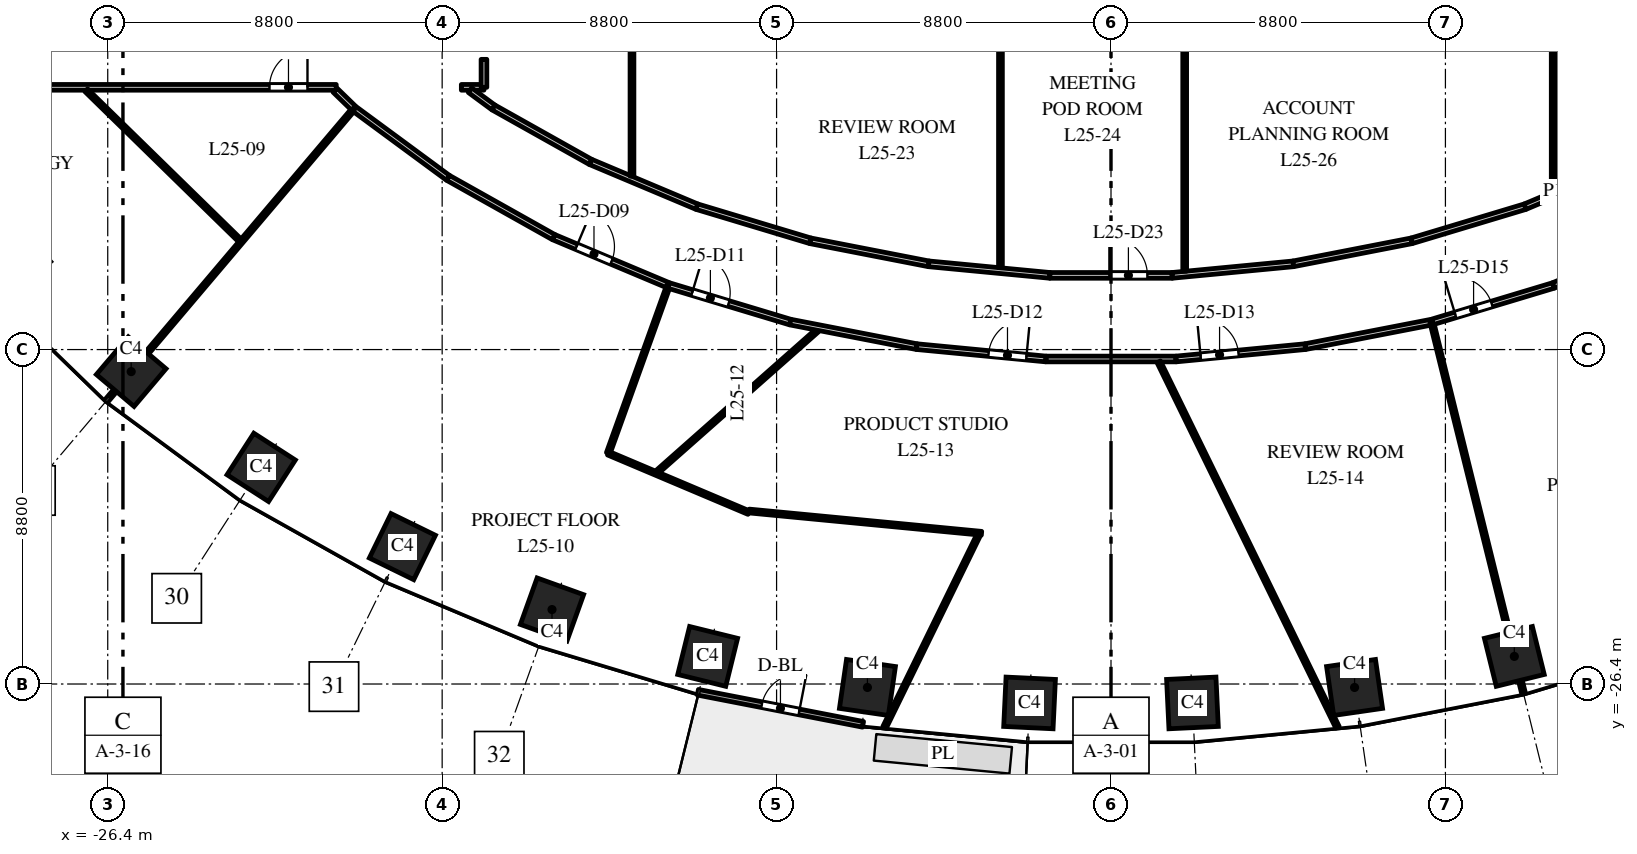
"""IFC4 building model, lengths in metres.
Left out: names, types, materials, properties, quantities, classifications, styles, units other than length and angle.
Written with IfcOpenShell. Run it as: python <this file> out.ifc"""

import sys

from ifc_helpers import new_model, si_unit, direction, frame, frame_2d, origin, origin_2d, place, context, subcontext, project, spatial, rectangle, extrude, element, fill, save


model = new_model("IFC4")
c1 = context("Model", 3, precision=1e-05, world=origin(), true_north=direction((0.0, 1.0)))
c2 = subcontext(c1, "Body", "Model", "MODEL_VIEW")
j1 = project(units=[si_unit("LENGTHUNIT", "METRE"), si_unit("PLANEANGLEUNIT", "RADIAN")], contexts=[c1])
p1 = place(None, origin())
s1 = spatial("IfcSite", under=j1, at=p1, CompositionType="ELEMENT")
p2 = place(p1, origin())
s2 = spatial("IfcBuilding", under=s1, at=p2, CompositionType="ELEMENT")
p3 = place(p2, frame((0.0, 0.0, 112.0)))
s3 = spatial("IfcBuildingStorey", under=s2, at=p3, CompositionType="ELEMENT", Elevation=112.0)
for number, where, z_axis, x_axis in (
    (1, (-25.783, -18.18, 0.0), (0.0, 0.0, 1.0), (0.763, -0.646, 0.0)),
    (2, (-22.362, -20.7, 0.0), (0.0, 0.0, 1.0), (0.84, -0.542, 0.0)),
    (3, (-18.646, -22.785, 0.0), (0.0, 0.0, 1.0), (0.898, -0.439, 0.0)),
    (4, (-14.709, -24.441, 0.0), (0.0, 0.0, 1.0), (0.941, -0.338, 0.0)),
    (5, (-10.613, -25.674, 0.0), (0.0, 0.0, 1.0), (0.971, -0.24, 0.0)),
    (6, (-6.409, -26.491, 0.0), (0.0, 0.0, 1.0), (0.99, -0.143, 0.0)),
    (7, (-2.143, -26.898, 0.0), (0.0, 0.0, 1.0), (0.999, -0.048, 0.0)),
    (8, (2.143, -26.898, 0.0), (0.0, 0.0, 1.0), (0.999, 0.048, 0.0)),
    (9, (6.409, -26.491, 0.0), (0.0, 0.0, 1.0), (0.99, 0.143, 0.0)),
    (10, (10.613, -25.674, 0.0), (0.0, 0.0, 1.0), (0.971, 0.24, 0.0)),
):
    element("IfcColumn", number, at=place(p3, frame(where, z_axis=z_axis, x_axis=x_axis)), inside=s3, PredefinedType="COLUMN", context=c2, shape_type="SweptSolid", body=[
        extrude(rectangle(XDim=1.3, YDim=1.3, at=origin_2d()), origin(), (0.0, 0.0, 1.0), 4.0),
    ])
p4 = place(p3, frame((-10.871, -26.617, 0.0), z_axis=(0.0, 0.0, 1.0), x_axis=(0.981631174778, -0.190788460615, 0.0)))
e11 = element("IfcWall", 11, at=p4, inside=s3, PredefinedType="STANDARD", context=c2, shape_type="SweptSolid", body=[
    extrude(rectangle(XDim=4.426, YDim=0.15, at=frame_2d((2.213, 0.0))), origin(), (0.0, 0.0, 1.0), 3.7),
])
p5 = place(p4, frame((1.713, 0.0, 0.0)))
e12 = element("IfcOpeningElement", 12, at=p5, cuts=e11, PredefinedType="OPENING", context=c2, shape_type="SweptSolid", body=[
    extrude(rectangle(XDim=1.0, YDim=2.4, at=frame_2d((0.5, 1.2))), frame((0.0, 0.085, 0.0), z_axis=(0.0, -1.0, 0.0), x_axis=(1.0, 0.0, 0.0)), (0.0, 0.0, 1.0), 0.17),
])
p6 = place(p3, frame((-31.5, -10.7, 0.0), z_axis=(0.0, 0.0, 1.0), x_axis=(1.0, 0.0, 0.0)))
e13 = element("IfcWall", 13, at=p6, inside=s3, PredefinedType="PARTITIONING", context=c2, shape_type="SweptSolid", body=[
    extrude(rectangle(XDim=11.113, YDim=0.15, at=frame_2d((5.557, 0.0))), origin(), (0.0, 0.0, 1.0), 3.1),
])
p7 = place(p6, frame((1.4, 0.0, 0.0)))
e14 = element("IfcOpeningElement", 14, at=p7, cuts=e13, PredefinedType="OPENING", context=c2, shape_type="SweptSolid", body=[
    extrude(rectangle(XDim=1.0, YDim=2.1, at=frame_2d((0.5, 1.05))), frame((0.0, 0.085, 0.0), z_axis=(0.0, -1.0, 0.0), x_axis=(1.0, 0.0, 0.0)), (0.0, 0.0, 1.0), 0.17),
])
p8 = place(p6, frame((9.356, 0.0, 0.0)))
e15 = element("IfcOpeningElement", 15, at=p8, cuts=e13, PredefinedType="OPENING", context=c2, shape_type="SweptSolid", body=[
    extrude(rectangle(XDim=1.0, YDim=2.1, at=frame_2d((0.5, 1.05))), frame((0.0, 0.085, 0.0), z_axis=(0.0, -1.0, 0.0), x_axis=(1.0, 0.0, 0.0)), (0.0, 0.0, 1.0), 0.17),
])
p9 = place(p3, frame((-26.965, -10.778, 0.0), z_axis=(0.0, 0.0, 1.0), x_axis=(0.715118482903, -0.699003258512, 0.0)))
e16 = element("IfcWall", 16, at=p9, inside=s3, PredefinedType="PARTITIONING", context=c2, shape_type="SweptSolid", body=[
    extrude(rectangle(XDim=5.651, YDim=0.1, at=frame_2d((2.825, 0.0))), origin(), (0.0, 0.0, 1.0), 3.7),
])
p10 = place(p3, frame((-26.43, -18.945, 0.0), z_axis=(0.0, 0.0, 1.0), x_axis=(0.64633128205, 0.763056927, 0.0)))
e17 = element("IfcWall", 17, at=p10, inside=s3, PredefinedType="PARTITIONING", context=c2, shape_type="SweptSolid", body=[
    extrude(rectangle(XDim=10.069, YDim=0.1, at=frame_2d((5.034, 0.0))), origin(), (0.0, 0.0, 1.0), 3.7),
])
p11 = place(p3, frame((-20.418, -10.775, 0.0), z_axis=(0.0, 0.0, 1.0), x_axis=(0.717145300924, -0.69692368116, 0.0)))
e18 = element("IfcWall", 18, at=p11, inside=s3, PredefinedType="PARTITIONING", context=c2, shape_type="SweptSolid", body=[
    extrude(rectangle(XDim=0.676, YDim=0.15, at=frame_2d((0.338, 0.0))), origin(), (0.0, 0.0, 1.0), 3.7),
])
p12 = place(p3, frame((-19.903, -11.272, 0.0), z_axis=(0.0, 0.0, 1.0), x_axis=(0.805228684186, -0.592964388613, 0.0)))
e19 = element("IfcWall", 19, at=p12, inside=s3, PredefinedType="PARTITIONING", context=c2, shape_type="SweptSolid", body=[
    extrude(rectangle(XDim=3.052, YDim=0.15, at=frame_2d((1.526, 0.0))), origin(), (0.0, 0.0, 1.0), 2.75),
])
p13 = place(p3, frame((-17.445, -13.082, 0.0), z_axis=(0.0, 0.0, 1.0), x_axis=(0.872072095629, -0.489377420837, 0.0)))
e20 = element("IfcWall", 20, at=p13, inside=s3, PredefinedType="PARTITIONING", context=c2, shape_type="SweptSolid", body=[
    extrude(rectangle(XDim=3.188, YDim=0.15, at=frame_2d((1.594, 0.0))), origin(), (0.0, 0.0, 1.0), 3.7),
])
p14 = place(p3, frame((-17.095, -10.7, 0.0), z_axis=(0.0, 0.0, 1.0), x_axis=(1.0, 0.0, 0.0)))
e21 = element("IfcWall", 21, at=p14, inside=s3, PredefinedType="PARTITIONING", context=c2, shape_type="SweptSolid", body=[
    extrude(rectangle(XDim=0.595, YDim=0.15, at=frame_2d((0.297, 0.0))), origin(), (0.0, 0.0, 1.0), 3.7),
])
p15 = place(p3, frame((-16.867, -10.775, 0.0), z_axis=(0.0, 0.0, 1.0), x_axis=(0.804751563869, -0.593611759023, 0.0)))
e22 = element("IfcWall", 22, at=p15, inside=s3, PredefinedType="PARTITIONING", context=c2, shape_type="SweptSolid", body=[
    extrude(rectangle(XDim=0.767, YDim=0.15, at=frame_2d((0.383, 0.0))), origin(), (0.0, 0.0, 1.0), 3.7),
])
p16 = place(p3, frame((-16.5, -10.7, 0.0), z_axis=(0.0, 0.0, 1.0), x_axis=(0.0, 1.0, 0.0)))
e23 = element("IfcWall", 23, at=p16, inside=s3, PredefinedType="PARTITIONING", context=c2, shape_type="SweptSolid", body=[
    extrude(rectangle(XDim=0.736, YDim=0.15, at=frame_2d((0.368, 0.0))), origin(), (0.0, 0.0, 1.0), 3.7),
])
p17 = place(p3, frame((-16.25, -11.23, 0.0), z_axis=(0.0, 0.0, 1.0), x_axis=(0.872147381065, -0.489243237767, 0.0)))
e24 = element("IfcWall", 24, at=p17, inside=s3, PredefinedType="PARTITIONING", context=c2, shape_type="SweptSolid", body=[
    extrude(rectangle(XDim=2.927, YDim=0.15, at=frame_2d((1.464, 0.0))), origin(), (0.0, 0.0, 1.0), 2.75),
])
p18 = place(p3, frame((-14.665, -14.642, 0.0), z_axis=(0.0, 0.0, 1.0), x_axis=(0.921850993012, -0.387544509293, 0.0)))
e25 = element("IfcWall", 25, at=p18, inside=s3, PredefinedType="PARTITIONING", context=c2, shape_type="SweptSolid", body=[
    extrude(rectangle(XDim=3.259, YDim=0.15, at=frame_2d((1.629, 0.0))), origin(), (0.0, 0.0, 1.0), 2.85),
])
p19 = place(p18, frame((0.65, 0.0, 0.0)))
e26 = element("IfcOpeningElement", 26, at=p19, cuts=e25, PredefinedType="OPENING", context=c2, shape_type="SweptSolid", body=[
    extrude(rectangle(XDim=1.0, YDim=2.1, at=frame_2d((0.5, 1.05))), frame((0.0, 0.085, 0.0), z_axis=(0.0, -1.0, 0.0), x_axis=(1.0, 0.0, 0.0)), (0.0, 0.0, 1.0), 0.17),
])
p20 = place(p3, frame((-13.697, -12.662, 0.0), z_axis=(0.0, 0.0, 1.0), x_axis=(0.921751821358, -0.387780324183, 0.0)))
e27 = element("IfcWall", 27, at=p20, inside=s3, PredefinedType="PARTITIONING", context=c2, shape_type="SweptSolid", body=[
    extrude(rectangle(XDim=3.038, YDim=0.15, at=frame_2d((1.519, 0.0))), origin(), (0.0, 0.0, 1.0), 2.85),
])
p21 = place(p3, frame((-13.23, -20.327, 0.0), z_axis=(0.0, 0.0, 1.0), x_axis=(0.338411379185, 0.940998266969, 0.0)))
e28 = element("IfcWall", 28, at=p21, inside=s3, PredefinedType="PARTITIONING", context=c2, shape_type="SweptSolid", body=[
    extrude(rectangle(XDim=4.687, YDim=0.1, at=frame_2d((2.343, 0.0))), origin(), (0.0, 0.0, 1.0), 3.7),
])
p22 = place(p3, frame((-13.23, -20.327, 0.0), z_axis=(0.0, 0.0, 1.0), x_axis=(0.921068797825, -0.389399884017, 0.0)))
e29 = element("IfcWall", 29, at=p22, inside=s3, PredefinedType="PARTITIONING", context=c2, shape_type="SweptSolid", body=[
    extrude(rectangle(XDim=4.014, YDim=0.1, at=frame_2d((2.007, 0.0))), origin(), (0.0, 0.0, 1.0), 3.7),
])
p23 = place(p3, frame((-12.605, -13.036, 0.0), z_axis=(0.0, 0.0, 1.0), x_axis=(0.0, 1.0, 0.0)))
e30 = element("IfcWall", 30, at=p23, inside=s3, PredefinedType="PARTITIONING", context=c2, shape_type="SweptSolid", body=[
    extrude(rectangle(XDim=26.072, YDim=0.1, at=frame_2d((13.036, 0.0))), origin(), (0.0, 0.0, 1.0), 2.75),
])
p24 = place(p3, frame((-11.938, -20.818, 0.0), z_axis=(0.0, 0.0, 1.0), x_axis=(0.749089420646, 0.662468897289, 0.0)))
e31 = element("IfcWall", 31, at=p24, inside=s3, PredefinedType="PARTITIONING", context=c2, shape_type="SweptSolid", body=[
    extrude(rectangle(XDim=5.62, YDim=0.1, at=frame_2d((2.81, 0.0))), origin(), (0.0, 0.0, 1.0), 3.7),
])
p25 = place(p3, frame((-11.643, -15.913, 0.0), z_axis=(0.0, 0.0, 1.0), x_axis=(0.957584891346, -0.288151307243, 0.0)))
e32 = element("IfcWall", 32, at=p25, inside=s3, PredefinedType="PARTITIONING", context=c2, shape_type="SweptSolid", body=[
    extrude(rectangle(XDim=3.345, YDim=0.15, at=frame_2d((1.672, 0.0))), origin(), (0.0, 0.0, 1.0), 3.7),
])
p26 = place(p25, frame((0.65, 0.0, 0.0)))
e33 = element("IfcOpeningElement", 33, at=p26, cuts=e32, PredefinedType="OPENING", context=c2, shape_type="SweptSolid", body=[
    extrude(rectangle(XDim=1.0, YDim=2.1, at=frame_2d((0.5, 1.05))), frame((0.0, 0.085, 0.0), z_axis=(0.0, -1.0, 0.0), x_axis=(1.0, 0.0, 0.0)), (0.0, 0.0, 1.0), 0.17),
])
p27 = place(p3, frame((-10.897, -13.84, 0.0), z_axis=(0.0, 0.0, 1.0), x_axis=(0.957606118849, -0.28808075455, 0.0)))
e34 = element("IfcWall", 34, at=p27, inside=s3, PredefinedType="PARTITIONING", context=c2, shape_type="SweptSolid", body=[
    extrude(rectangle(XDim=3.117, YDim=0.15, at=frame_2d((1.559, 0.0))), origin(), (0.0, 0.0, 1.0), 3.7),
])
p28 = place(p3, frame((-9.523, -21.848, 0.0), z_axis=(0.0, 0.0, 1.0), x_axis=(0.995438322378, -0.095407265659, 0.0)))
e35 = element("IfcWall", 35, at=p28, inside=s3, PredefinedType="PARTITIONING", context=c2, shape_type="SweptSolid", body=[
    extrude(rectangle(XDim=6.144, YDim=0.1, at=frame_2d((3.072, 0.0))), origin(), (0.0, 0.0, 1.0), 2.85),
])
p29 = place(p3, frame((-8.44, -16.877, 0.0), z_axis=(0.0, 0.0, 1.0), x_axis=(0.981665220565, -0.190613207134, 0.0)))
e36 = element("IfcWall", 36, at=p29, inside=s3, PredefinedType="PARTITIONING", context=c2, shape_type="SweptSolid", body=[
    extrude(rectangle(XDim=3.389, YDim=0.15, at=frame_2d((1.695, 0.0))), origin(), (0.0, 0.0, 1.0), 2.85),
])
p30 = place(p3, frame((-7.912, -14.738, 0.0), z_axis=(0.0, 0.0, 1.0), x_axis=(0.981588545092, -0.191007665145, 0.0)))
e37 = element("IfcWall", 37, at=p30, inside=s3, PredefinedType="PARTITIONING", context=c2, shape_type="SweptSolid", body=[
    extrude(rectangle(XDim=3.172, YDim=0.15, at=frame_2d((1.586, 0.0))), origin(), (0.0, 0.0, 1.0), 2.85),
])
p31 = place(p3, frame((-5.958, -27.538, 0.0), z_axis=(0.0, 0.0, 1.0), x_axis=(0.439326712168, 0.8983273568, 0.0)))
e38 = element("IfcWall", 38, at=p31, inside=s3, PredefinedType="PARTITIONING", context=c2, shape_type="SweptSolid", body=[
    extrude(rectangle(XDim=5.634, YDim=0.1, at=frame_2d((2.817, 0.0))), origin(), (0.0, 0.0, 1.0), 2.9),
])
p32 = place(p3, frame((-5.113, -17.523, 0.0), z_axis=(0.0, 0.0, 1.0), x_axis=(0.995466844572, -0.095109207532, 0.0)))
e39 = element("IfcWall", 39, at=p32, inside=s3, PredefinedType="PARTITIONING", context=c2, shape_type="SweptSolid", body=[
    extrude(rectangle(XDim=3.417, YDim=0.15, at=frame_2d((1.708, 0.0))), origin(), (0.0, 0.0, 1.0), 3.7),
])
p33 = place(p32, frame((1.9, 0.0, 0.0)))
e40 = element("IfcOpeningElement", 40, at=p33, cuts=e39, PredefinedType="OPENING", context=c2, shape_type="SweptSolid", body=[
    extrude(rectangle(XDim=1.0, YDim=2.1, at=frame_2d((0.5, 1.05))), frame((0.0, 0.085, 0.0), z_axis=(0.0, -1.0, 0.0), x_axis=(1.0, 0.0, 0.0)), (0.0, 0.0, 1.0), 0.17),
])
p34 = place(p3, frame((-4.798, -15.344, 0.0), z_axis=(0.0, 0.0, 1.0), x_axis=(0.995491705426, -0.09484863957, 0.0)))
e41 = element("IfcWall", 41, at=p34, inside=s3, PredefinedType="PARTITIONING", context=c2, shape_type="SweptSolid", body=[
    extrude(rectangle(XDim=3.205, YDim=0.15, at=frame_2d((1.602, 0.0))), origin(), (0.0, 0.0, 1.0), 3.7),
])
p35 = place(p3, frame((-2.909, -15.445, 0.0), z_axis=(0.0, 0.0, 1.0), x_axis=(0.0, 1.0, 0.0)))
e42 = element("IfcWall", 42, at=p35, inside=s3, PredefinedType="PARTITIONING", context=c2, shape_type="SweptSolid", body=[
    extrude(rectangle(XDim=8.363, YDim=0.1, at=frame_2d((4.182, 0.0))), origin(), (0.0, 0.0, 1.0), 2.9),
])
p36 = place(p3, frame((-1.712, -17.848, 0.0), z_axis=(0.0, 0.0, 1.0), x_axis=(1.0, 0.0, 0.0)))
e43 = element("IfcWall", 43, at=p36, inside=s3, PredefinedType="PARTITIONING", context=c2, shape_type="SweptSolid", body=[
    extrude(rectangle(XDim=3.424, YDim=0.15, at=frame_2d((1.712, 0.0))), origin(), (0.0, 0.0, 1.0), 2.85),
])
p37 = place(p3, frame((-1.608, -15.648, 0.0), z_axis=(0.0, 0.0, 1.0), x_axis=(1.0, 0.0, 0.0)))
e44 = element("IfcWall", 44, at=p37, inside=s3, PredefinedType="PARTITIONING", context=c2, shape_type="SweptSolid", body=[
    extrude(rectangle(XDim=3.216, YDim=0.15, at=frame_2d((1.608, 0.0))), origin(), (0.0, 0.0, 1.0), 2.85),
])
p38 = place(p37, frame((1.566, 0.0, 0.0)))
e45 = element("IfcOpeningElement", 45, at=p38, cuts=e44, PredefinedType="OPENING", context=c2, shape_type="SweptSolid", body=[
    extrude(rectangle(XDim=1.0, YDim=2.1, at=frame_2d((0.5, 1.05))), frame((0.0, 0.085, 0.0), z_axis=(0.0, -1.0, 0.0), x_axis=(1.0, 0.0, 0.0)), (0.0, 0.0, 1.0), 0.17),
])
p39 = place(p3, frame((1.257, -17.923, 0.0), z_axis=(0.0, 0.0, 1.0), x_axis=(0.439339826825, -0.898320942963, 0.0)))
e46 = element("IfcWall", 46, at=p39, inside=s3, PredefinedType="PARTITIONING", context=c2, shape_type="SweptSolid", body=[
    extrude(rectangle(XDim=10.702, YDim=0.1, at=frame_2d((5.351, 0.0))), origin(), (0.0, 0.0, 1.0), 2.9),
])
p40 = place(p3, frame((1.608, -15.648, 0.0), z_axis=(0.0, 0.0, 1.0), x_axis=(0.995491705426, 0.09484863957, 0.0)))
e47 = element("IfcWall", 47, at=p40, inside=s3, PredefinedType="PARTITIONING", context=c2, shape_type="SweptSolid", body=[
    extrude(rectangle(XDim=3.205, YDim=0.15, at=frame_2d((1.602, 0.0))), origin(), (0.0, 0.0, 1.0), 2.85),
])
p41 = place(p3, frame((1.712, -17.848, 0.0), z_axis=(0.0, 0.0, 1.0), x_axis=(0.995466844572, 0.095109207532, 0.0)))
e48 = element("IfcWall", 48, at=p41, inside=s3, PredefinedType="PARTITIONING", context=c2, shape_type="SweptSolid", body=[
    extrude(rectangle(XDim=3.417, YDim=0.15, at=frame_2d((1.708, 0.0))), origin(), (0.0, 0.0, 1.0), 2.85),
])
p42 = place(p41, frame((0.65, 0.0, 0.0)))
e49 = element("IfcOpeningElement", 49, at=p42, cuts=e48, PredefinedType="OPENING", context=c2, shape_type="SweptSolid", body=[
    extrude(rectangle(XDim=1.0, YDim=2.1, at=frame_2d((0.5, 1.05))), frame((0.0, 0.085, 0.0), z_axis=(0.0, -1.0, 0.0), x_axis=(1.0, 0.0, 0.0)), (0.0, 0.0, 1.0), 0.17),
])
p43 = place(p3, frame((1.939, -15.537, 0.0), z_axis=(0.0, 0.0, 1.0), x_axis=(0.0, 1.0, 0.0)))
e50 = element("IfcWall", 50, at=p43, inside=s3, PredefinedType="PARTITIONING", context=c2, shape_type="SweptSolid", body=[
    extrude(rectangle(XDim=8.23, YDim=0.1, at=frame_2d((4.115, 0.0))), origin(), (0.0, 0.0, 1.0), 2.85),
])
p44 = place(p3, frame((4.798, -15.344, 0.0), z_axis=(0.0, 0.0, 1.0), x_axis=(0.981588545092, 0.191007665145, 0.0)))
e51 = element("IfcWall", 51, at=p44, inside=s3, PredefinedType="PARTITIONING", context=c2, shape_type="SweptSolid", body=[
    extrude(rectangle(XDim=3.172, YDim=0.15, at=frame_2d((1.586, 0.0))), origin(), (0.0, 0.0, 1.0), 3.7),
])
p45 = place(p3, frame((5.113, -17.523, 0.0), z_axis=(0.0, 0.0, 1.0), x_axis=(0.981690354374, 0.19048372143, 0.0)))
e52 = element("IfcWall", 52, at=p45, inside=s3, PredefinedType="PARTITIONING", context=c2, shape_type="SweptSolid", body=[
    extrude(rectangle(XDim=3.37, YDim=0.15, at=frame_2d((1.685, 0.0))), origin(), (0.0, 0.0, 1.0), 3.7),
])
p46 = place(p3, frame((7.912, -14.738, 0.0), z_axis=(0.0, 0.0, 1.0), x_axis=(0.957606118849, 0.28808075455, 0.0)))
e53 = element("IfcWall", 53, at=p46, inside=s3, PredefinedType="PARTITIONING", context=c2, shape_type="SweptSolid", body=[
    extrude(rectangle(XDim=3.117, YDim=0.15, at=frame_2d((1.559, 0.0))), origin(), (0.0, 0.0, 1.0), 2.85),
])
p47 = place(p3, frame((8.441, -16.88, 0.0), z_axis=(0.0, 0.0, 1.0), x_axis=(0.240079290568, -0.970753281859, 0.0)))
e54 = element("IfcWall", 54, at=p47, inside=s3, PredefinedType="PARTITIONING", context=c2, shape_type="SweptSolid", body=[
    extrude(rectangle(XDim=10.059, YDim=0.1, at=frame_2d((5.03, 0.0))), origin(), (0.0, 0.0, 1.0), 2.9),
])
p48 = place(p3, frame((8.459, -16.871, 0.0), z_axis=(0.0, 0.0, 1.0), x_axis=(0.957595601217, 0.288115713784, 0.0)))
e55 = element("IfcWall", 55, at=p48, inside=s3, PredefinedType="PARTITIONING", context=c2, shape_type="SweptSolid", body=[
    extrude(rectangle(XDim=3.325, YDim=0.15, at=frame_2d((1.663, 0.0))), origin(), (0.0, 0.0, 1.0), 2.85),
])
p49 = place(p48, frame((0.63, 0.0, 0.0)))
e56 = element("IfcOpeningElement", 56, at=p49, cuts=e55, PredefinedType="OPENING", context=c2, shape_type="SweptSolid", body=[
    extrude(rectangle(XDim=1.0, YDim=2.1, at=frame_2d((0.5, 1.05))), frame((0.0, 0.085, 0.0), z_axis=(0.0, -1.0, 0.0), x_axis=(1.0, 0.0, 0.0)), (0.0, 0.0, 1.0), 0.17),
])
p50 = place(p3, frame((10.897, -13.84, 0.0), z_axis=(0.0, 0.0, 1.0), x_axis=(0.921751821358, 0.387780324183, 0.0)))
e57 = element("IfcWall", 57, at=p50, inside=s3, PredefinedType="PARTITIONING", context=c2, shape_type="SweptSolid", body=[
    extrude(rectangle(XDim=3.038, YDim=0.15, at=frame_2d((1.519, 0.0))), origin(), (0.0, 0.0, 1.0), 3.7),
])
p51 = place(p3, frame((11.636, -13.444, 0.0), z_axis=(0.0, 0.0, 1.0), x_axis=(0.0, 1.0, 0.0)))
e58 = element("IfcWall", 58, at=p51, inside=s3, PredefinedType="PARTITIONING", context=c2, shape_type="SweptSolid", body=[
    extrude(rectangle(XDim=26.888, YDim=0.1, at=frame_2d((13.444, 0.0))), origin(), (0.0, 0.0, 1.0), 2.75),
])
p52 = place(p3, frame((11.643, -15.913, 0.0), z_axis=(0.0, 0.0, 1.0), x_axis=(0.921789499058, 0.38769075231, 0.0)))
e59 = element("IfcWall", 59, at=p52, inside=s3, PredefinedType="PARTITIONING", context=c2, shape_type="SweptSolid", body=[
    extrude(rectangle(XDim=3.278, YDim=0.15, at=frame_2d((1.639, 0.0))), origin(), (0.0, 0.0, 1.0), 3.7),
])
p53 = place(p5, origin())
e60 = element("IfcDoor", 60, at=p53, inside=s3, OperationType="SINGLE_SWING_RIGHT", PredefinedType="DOOR", context=c2, shape_type="SweptSolid", body=[
    extrude(rectangle(XDim=1.0, YDim=2.4, at=frame_2d((0.5, 1.2))), frame((0.0, 0.025, 0.0), z_axis=(0.0, -1.0, 0.0), x_axis=(1.0, 0.0, 0.0)), (0.0, 0.0, 1.0), 0.05),
])
fill(e12, e60)
p54 = place(p8, origin())
e61 = element("IfcDoor", 61, at=p54, inside=s3, OperationType="SINGLE_SWING_RIGHT", PredefinedType="DOOR", context=c2, shape_type="SweptSolid", body=[
    extrude(rectangle(XDim=1.0, YDim=2.1, at=frame_2d((0.5, 1.05))), frame((0.0, 0.025, 0.0), z_axis=(0.0, -1.0, 0.0), x_axis=(1.0, 0.0, 0.0)), (0.0, 0.0, 1.0), 0.05),
])
fill(e15, e61)
p55 = place(p19, origin())
e62 = element("IfcDoor", 62, at=p55, inside=s3, OperationType="SINGLE_SWING_LEFT", PredefinedType="DOOR", context=c2, shape_type="SweptSolid", body=[
    extrude(rectangle(XDim=1.0, YDim=2.1, at=frame_2d((0.5, 1.05))), frame((0.0, 0.025, 0.0), z_axis=(0.0, -1.0, 0.0), x_axis=(1.0, 0.0, 0.0)), (0.0, 0.0, 1.0), 0.05),
])
fill(e26, e62)
p56 = place(p26, origin())
e63 = element("IfcDoor", 63, at=p56, inside=s3, OperationType="SINGLE_SWING_LEFT", PredefinedType="DOOR", context=c2, shape_type="SweptSolid", body=[
    extrude(rectangle(XDim=1.0, YDim=2.1, at=frame_2d((0.5, 1.05))), frame((0.0, 0.025, 0.0), z_axis=(0.0, -1.0, 0.0), x_axis=(1.0, 0.0, 0.0)), (0.0, 0.0, 1.0), 0.05),
])
fill(e33, e63)
p57 = place(p33, origin())
e64 = element("IfcDoor", 64, at=p57, inside=s3, OperationType="SINGLE_SWING_RIGHT", PredefinedType="DOOR", context=c2, shape_type="SweptSolid", body=[
    extrude(rectangle(XDim=1.0, YDim=2.1, at=frame_2d((0.5, 1.05))), frame((0.0, 0.025, 0.0), z_axis=(0.0, -1.0, 0.0), x_axis=(1.0, 0.0, 0.0)), (0.0, 0.0, 1.0), 0.05),
])
fill(e40, e64)
p58 = place(p42, origin())
e65 = element("IfcDoor", 65, at=p58, inside=s3, OperationType="SINGLE_SWING_LEFT", PredefinedType="DOOR", context=c2, shape_type="SweptSolid", body=[
    extrude(rectangle(XDim=1.0, YDim=2.1, at=frame_2d((0.5, 1.05))), frame((0.0, 0.025, 0.0), z_axis=(0.0, -1.0, 0.0), x_axis=(1.0, 0.0, 0.0)), (0.0, 0.0, 1.0), 0.05),
])
fill(e49, e65)
p59 = place(p49, origin())
e66 = element("IfcDoor", 66, at=p59, inside=s3, OperationType="SINGLE_SWING_LEFT", PredefinedType="DOOR", context=c2, shape_type="SweptSolid", body=[
    extrude(rectangle(XDim=1.0, YDim=2.1, at=frame_2d((0.5, 1.05))), frame((0.0, 0.025, 0.0), z_axis=(0.0, -1.0, 0.0), x_axis=(1.0, 0.0, 0.0)), (0.0, 0.0, 1.0), 0.05),
])
fill(e56, e66)
p60 = place(p38, origin())
e67 = element("IfcDoor", 67, at=p60, inside=s3, OperationType="SINGLE_SWING_LEFT", PredefinedType="DOOR", context=c2, shape_type="SweptSolid", body=[
    extrude(rectangle(XDim=1.0, YDim=2.1, at=frame_2d((0.5, 1.05))), frame((0.0, 0.025, 0.0), z_axis=(0.0, -1.0, 0.0), x_axis=(1.0, 0.0, 0.0)), (0.0, 0.0, 1.0), 0.05),
])
fill(e45, e67)
save(model, sys.argv[1])
